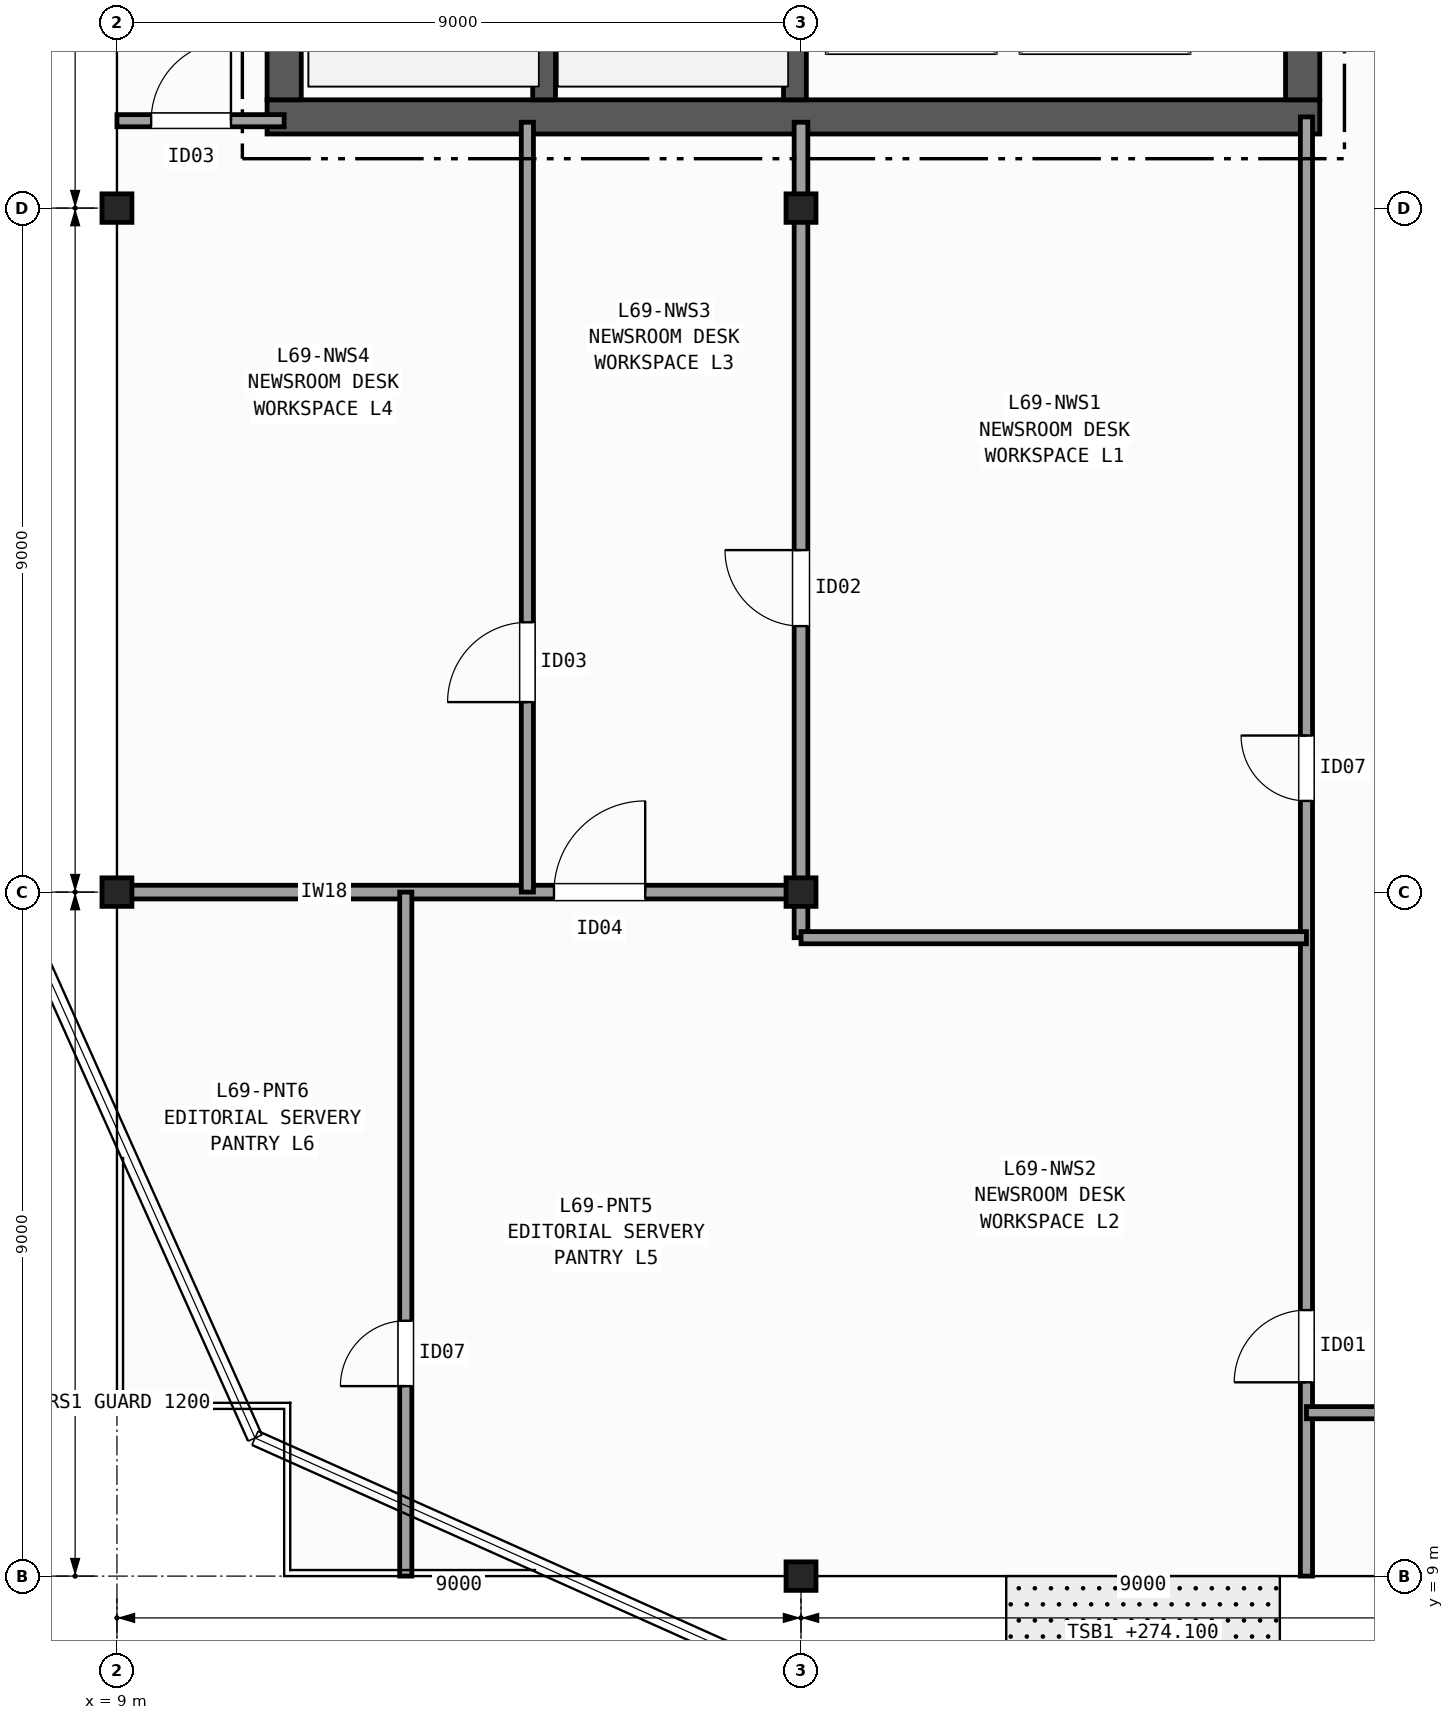
"""IFC4 building model, lengths in metres.
Left out: names, types, materials, properties, quantities, classifications, styles, units other than length and angle.
Written with IfcOpenShell. Run it as: python <this file> out.ifc"""

import sys

from ifc_helpers import new_model, si_unit, direction, frame, frame_2d, origin, origin_2d, place, context, subcontext, project, spatial, rectangle, i_section, extrude, element, fill, save


model = new_model("IFC4")
c1 = context("Model", 3, precision=1e-05, world=origin(), true_north=direction((0.0, 1.0)))
c2 = subcontext(c1, "Body", "Model", "MODEL_VIEW")
j1 = project(units=[si_unit("LENGTHUNIT", "METRE"), si_unit("PLANEANGLEUNIT", "RADIAN")], contexts=[c1])
p1 = place(None, origin())
s1 = spatial("IfcSite", under=j1, at=p1, CompositionType="ELEMENT")
p2 = place(p1, origin())
s2 = spatial("IfcBuilding", under=s1, at=p2, CompositionType="ELEMENT")
p3 = place(p2, frame((0.0, 0.0, 274.1)))
s3 = spatial("IfcBuildingStorey", under=s2, at=p3, CompositionType="ELEMENT", Elevation=274.1)
for number, where, z_axis, x_axis in (
    (1, (9.0, 18.0, 0.0), (0.0, 0.0, 1.0), (1.0, 0.0, 0.0)),
    (2, (9.0, 27.0, 0.0), (0.0, 0.0, 1.0), (1.0, 0.0, 0.0)),
    (3, (18.0, 9.0, 0.0), (0.0, 0.0, 1.0), (1.0, 0.0, 0.0)),
    (4, (18.0, 18.0, 0.0), (0.0, 0.0, 1.0), (1.0, 0.0, 0.0)),
    (5, (18.0, 27.0, 0.0), (0.0, 0.0, 1.0), (1.0, 0.0, 0.0)),
):
    element("IfcColumn", number, at=place(p3, frame(where, z_axis=z_axis, x_axis=x_axis)), inside=s3, PredefinedType="COLUMN", context=c2, shape_type="SweptSolid", body=[
        extrude(i_section(OverallWidth=0.394, OverallDepth=0.375, WebThickness=0.017, FlangeThickness=0.028, FilletRadius=0.015, at=origin_2d()), origin(), (0.0, 0.0, 1.0), 3.7),
    ])
p4 = place(p3, frame((10.975, 28.2, 0.0), z_axis=(0.0, 0.0, 1.0), x_axis=(1.0, 0.0, 0.0)))
e6 = element("IfcWall", 6, at=p4, inside=s3, PredefinedType="SHEAR", context=c2, shape_type="SweptSolid", body=[
    extrude(rectangle(XDim=13.85, YDim=0.45, at=frame_2d((6.925, 0.0))), origin(), (0.0, 0.0, 1.0), 3.42),
])
p5 = place(p3, frame((11.2, 42.175, 0.0), z_axis=(0.0, 0.0, 1.0), x_axis=(0.0, -1.0, 0.0)))
e7 = element("IfcWall", 7, at=p5, inside=s3, PredefinedType="SHEAR", context=c2, shape_type="SweptSolid", body=[
    extrude(rectangle(XDim=13.75, YDim=0.45, at=frame_2d((6.875, 0.0))), origin(), (0.0, 0.0, 1.0), 3.42),
])
p6 = place(p3, frame((24.6, 28.425, 0.0), z_axis=(0.0, 0.0, 1.0), x_axis=(0.0, 1.0, 0.0)))
e8 = element("IfcWall", 8, at=p6, inside=s3, PredefinedType="SHEAR", context=c2, shape_type="SweptSolid", body=[
    extrude(rectangle(XDim=13.75, YDim=0.45, at=frame_2d((6.875, 0.0))), origin(), (0.0, 0.0, 1.0), 3.42),
])
p7 = place(p6, frame((3.375, 0.0, 0.0)))
e9 = element("IfcOpeningElement", 9, at=p7, cuts=e8, PredefinedType="OPENING", context=c2, shape_type="SweptSolid", body=[
    extrude(rectangle(XDim=1.5, YDim=2.2, at=frame_2d((0.75, 1.1))), frame((0.0, 0.235, 0.0), z_axis=(0.0, -1.0, 0.0), x_axis=(1.0, 0.0, 0.0)), (0.0, 0.0, 1.0), 0.47),
])
p8 = place(p6, frame((9.975, 0.0, 0.0)))
e10 = element("IfcOpeningElement", 10, at=p8, cuts=e8, PredefinedType="OPENING", context=c2, shape_type="SweptSolid", body=[
    extrude(rectangle(XDim=0.9, YDim=2.1, at=frame_2d((0.45, 1.05))), frame((0.0, 0.235, 0.0), z_axis=(0.0, -1.0, 0.0), x_axis=(1.0, 0.0, 0.0)), (0.0, 0.0, 1.0), 0.47),
])
p9 = place(p3, frame((14.62, 28.425, 0.0), z_axis=(0.0, 0.0, 1.0), x_axis=(0.0, 1.0, 0.0)))
e11 = element("IfcWall", 11, at=p9, inside=s3, PredefinedType="SHEAR", context=c2, shape_type="SweptSolid", body=[
    extrude(rectangle(XDim=9.025, YDim=0.3, at=frame_2d((4.512, 0.0))), origin(), (0.0, 0.0, 1.0), 3.42),
])
p10 = place(p3, frame((17.92, 42.175, 0.0), z_axis=(0.0, 0.0, 1.0), x_axis=(0.0, -1.0, 0.0)))
e12 = element("IfcWall", 12, at=p10, inside=s3, PredefinedType="SHEAR", context=c2, shape_type="SweptSolid", body=[
    extrude(rectangle(XDim=13.75, YDim=0.3, at=frame_2d((6.875, 0.0))), origin(), (0.0, 0.0, 1.0), 3.42),
])
p11 = place(p10, frame((2.0, 0.0, 0.0)))
e13 = element("IfcOpeningElement", 13, at=p11, cuts=e12, PredefinedType="OPENING", context=c2, shape_type="SweptSolid", body=[
    extrude(rectangle(XDim=1.15, YDim=2.15, at=frame_2d((0.575, 1.075))), frame((0.0, 0.16, 0.0), z_axis=(0.0, -1.0, 0.0), x_axis=(1.0, 0.0, 0.0)), (0.0, 0.0, 1.0), 0.32),
])
p12 = place(p3, frame((9.0, 28.15, 0.0), z_axis=(0.0, 0.0, 1.0), x_axis=(1.0, 0.0, 0.0)))
e14 = element("IfcWall", 14, at=p12, inside=s3, PredefinedType="PARTITIONING", context=c2, shape_type="SweptSolid", body=[
    extrude(rectangle(XDim=2.2, YDim=0.16, at=frame_2d((1.1, 0.0))), origin(), (0.0, 0.0, 1.0), 2.707),
])
p13 = place(p12, frame((0.45, 0.0, 0.0)))
e15 = element("IfcOpeningElement", 15, at=p13, cuts=e14, PredefinedType="OPENING", context=c2, shape_type="SweptSolid", body=[
    extrude(rectangle(XDim=1.05, YDim=2.15, at=frame_2d((0.525, 1.075))), frame((0.0, 0.09, 0.0), z_axis=(0.0, -1.0, 0.0), x_axis=(1.0, 0.0, 0.0)), (0.0, 0.0, 1.0), 0.18),
])
p14 = place(p3, frame((24.65, 9.0, 0.0), z_axis=(0.0, 0.0, 1.0), x_axis=(0.0, 1.0, 0.0)))
e16 = element("IfcWall", 16, at=p14, inside=s3, PredefinedType="PARTITIONING", context=c2, shape_type="SweptSolid", body=[
    extrude(rectangle(XDim=19.2, YDim=0.16, at=frame_2d((9.6, 0.0))), origin(), (0.0, 0.0, 1.0), 2.707),
])
p15 = place(p14, frame((10.2, 0.0, 0.0)))
e17 = element("IfcOpeningElement", 17, at=p15, cuts=e16, PredefinedType="OPENING", context=c2, shape_type="SweptSolid", body=[
    extrude(rectangle(XDim=0.86, YDim=2.05, at=frame_2d((0.43, 1.025))), frame((0.0, 0.09, 0.0), z_axis=(0.0, -1.0, 0.0), x_axis=(1.0, 0.0, 0.0)), (0.0, 0.0, 1.0), 0.18),
])
p16 = place(p14, frame((2.55, 0.0, 0.0)))
e18 = element("IfcOpeningElement", 18, at=p16, cuts=e16, PredefinedType="OPENING", context=c2, shape_type="SweptSolid", body=[
    extrude(rectangle(XDim=0.95, YDim=2.1, at=frame_2d((0.475, 1.05))), frame((0.0, 0.09, 0.0), z_axis=(0.0, -1.0, 0.0), x_axis=(1.0, 0.0, 0.0)), (0.0, 0.0, 1.0), 0.18),
])
p17 = place(p3, frame((9.0, 18.0, 0.0), z_axis=(0.0, 0.0, 1.0), x_axis=(1.0, 0.0, 0.0)))
e19 = element("IfcWall", 19, at=p17, inside=s3, PredefinedType="PARTITIONING", context=c2, shape_type="SweptSolid", body=[
    extrude(rectangle(XDim=9.08, YDim=0.18, at=frame_2d((4.54, 0.0))), origin(), (0.0, 0.0, 1.0), 2.707),
])
p18 = place(p17, frame((5.75, 0.0, 0.0)))
e20 = element("IfcOpeningElement", 20, at=p18, cuts=e19, PredefinedType="OPENING", context=c2, shape_type="SweptSolid", body=[
    extrude(rectangle(XDim=1.2, YDim=2.15, at=frame_2d((0.6, 1.075))), frame((0.0, 0.1, 0.0), z_axis=(0.0, -1.0, 0.0), x_axis=(1.0, 0.0, 0.0)), (0.0, 0.0, 1.0), 0.2),
])
p19 = place(p3, frame((18.0, 17.4, 0.0), z_axis=(0.0, 0.0, 1.0), x_axis=(0.0, 1.0, 0.0)))
e21 = element("IfcWall", 21, at=p19, inside=s3, PredefinedType="PARTITIONING", context=c2, shape_type="SweptSolid", body=[
    extrude(rectangle(XDim=10.73, YDim=0.18, at=frame_2d((5.365, 0.0))), origin(), (0.0, 0.0, 1.0), 2.789),
])
p20 = place(p19, frame((4.1, 0.0, 0.0)))
e22 = element("IfcOpeningElement", 22, at=p20, cuts=e21, PredefinedType="OPENING", context=c2, shape_type="SweptSolid", body=[
    extrude(rectangle(XDim=1.0, YDim=2.1, at=frame_2d((0.5, 1.05))), frame((0.0, 0.1, 0.0), z_axis=(0.0, -1.0, 0.0), x_axis=(1.0, 0.0, 0.0)), (0.0, 0.0, 1.0), 0.2),
])
p21 = place(p3, frame((18.0, 17.4, 0.0), z_axis=(0.0, 0.0, 1.0), x_axis=(1.0, 0.0, 0.0)))
e23 = element("IfcWall", 23, at=p21, inside=s3, PredefinedType="PARTITIONING", context=c2, shape_type="SweptSolid", body=[
    extrude(rectangle(XDim=6.65, YDim=0.16, at=frame_2d((3.325, 0.0))), origin(), (0.0, 0.0, 1.0), 2.789),
])
p22 = place(p3, frame((14.4, 18.0, 0.0), z_axis=(0.0, 0.0, 1.0), x_axis=(0.0, 1.0, 0.0)))
e24 = element("IfcWall", 24, at=p22, inside=s3, PredefinedType="PARTITIONING", context=c2, shape_type="SweptSolid", body=[
    extrude(rectangle(XDim=10.13, YDim=0.16, at=frame_2d((5.065, 0.0))), origin(), (0.0, 0.0, 1.0), 2.789),
])
p23 = place(p22, frame((2.5, 0.0, 0.0)))
e25 = element("IfcOpeningElement", 25, at=p23, cuts=e24, PredefinedType="OPENING", context=c2, shape_type="SweptSolid", body=[
    extrude(rectangle(XDim=1.05, YDim=2.15, at=frame_2d((0.525, 1.075))), frame((0.0, 0.09, 0.0), z_axis=(0.0, -1.0, 0.0), x_axis=(1.0, 0.0, 0.0)), (0.0, 0.0, 1.0), 0.18),
])
p24 = place(p3, frame((12.8, 9.0, 0.0), z_axis=(0.0, 0.0, 1.0), x_axis=(0.0, 1.0, 0.0)))
e26 = element("IfcWall", 26, at=p24, inside=s3, PredefinedType="PARTITIONING", context=c2, shape_type="SweptSolid", body=[
    extrude(rectangle(XDim=9.0, YDim=0.16, at=frame_2d((4.5, 0.0))), origin(), (0.0, 0.0, 1.0), 2.789),
])
p25 = place(p24, frame((2.5, 0.0, 0.0)))
e27 = element("IfcOpeningElement", 27, at=p25, cuts=e26, PredefinedType="OPENING", context=c2, shape_type="SweptSolid", body=[
    extrude(rectangle(XDim=0.86, YDim=2.05, at=frame_2d((0.43, 1.025))), frame((0.0, 0.09, 0.0), z_axis=(0.0, -1.0, 0.0), x_axis=(1.0, 0.0, 0.0)), (0.0, 0.0, 1.0), 0.18),
])
p26 = place(p3, frame((24.65, 11.15, 0.0), z_axis=(0.0, 0.0, 1.0), x_axis=(1.0, 0.0, 0.0)))
e28 = element("IfcWall", 28, at=p26, inside=s3, PredefinedType="PARTITIONING", context=c2, shape_type="SweptSolid", body=[
    extrude(rectangle(XDim=4.75, YDim=0.16, at=frame_2d((2.375, 0.0))), origin(), (0.0, 0.0, 1.0), 2.792),
])
p27 = place(p26, frame((1.2, 0.0, 0.0)))
e29 = element("IfcOpeningElement", 29, at=p27, cuts=e28, PredefinedType="OPENING", context=c2, shape_type="SweptSolid", body=[
    extrude(rectangle(XDim=0.95, YDim=2.1, at=frame_2d((0.475, 1.05))), frame((0.0, 0.09, 0.0), z_axis=(0.0, -1.0, 0.0), x_axis=(1.0, 0.0, 0.0)), (0.0, 0.0, 1.0), 0.18),
])
p28 = place(p13, origin())
e30 = element("IfcDoor", 30, at=p28, inside=s3, OperationType="SINGLE_SWING_RIGHT", PredefinedType="DOOR", context=c2, shape_type="SweptSolid", body=[
    extrude(rectangle(XDim=1.05, YDim=2.15, at=frame_2d((0.525, 1.075))), frame((0.0, 0.025, 0.0), z_axis=(0.0, -1.0, 0.0), x_axis=(1.0, 0.0, 0.0)), (0.0, 0.0, 1.0), 0.05),
])
fill(e15, e30)
p29 = place(p15, origin())
e31 = element("IfcDoor", 31, at=p29, inside=s3, OperationType="SINGLE_SWING_RIGHT", PredefinedType="DOOR", context=c2, shape_type="SweptSolid", body=[
    extrude(rectangle(XDim=0.86, YDim=2.05, at=frame_2d((0.43, 1.025))), frame((0.0, 0.025, 0.0), z_axis=(0.0, -1.0, 0.0), x_axis=(1.0, 0.0, 0.0)), (0.0, 0.0, 1.0), 0.05),
])
fill(e17, e31)
p30 = place(p16, origin())
e32 = element("IfcDoor", 32, at=p30, inside=s3, OperationType="SINGLE_SWING_LEFT", PredefinedType="DOOR", context=c2, shape_type="SweptSolid", body=[
    extrude(rectangle(XDim=0.95, YDim=2.1, at=frame_2d((0.475, 1.05))), frame((0.0, 0.025, 0.0), z_axis=(0.0, -1.0, 0.0), x_axis=(1.0, 0.0, 0.0)), (0.0, 0.0, 1.0), 0.05),
])
fill(e18, e32)
p31 = place(p20, origin())
e33 = element("IfcDoor", 33, at=p31, inside=s3, OperationType="SINGLE_SWING_RIGHT", PredefinedType="DOOR", context=c2, shape_type="SweptSolid", body=[
    extrude(rectangle(XDim=1.0, YDim=2.1, at=frame_2d((0.5, 1.05))), frame((0.0, 0.025, 0.0), z_axis=(0.0, -1.0, 0.0), x_axis=(1.0, 0.0, 0.0)), (0.0, 0.0, 1.0), 0.05),
])
fill(e22, e33)
p32 = place(p23, origin())
e34 = element("IfcDoor", 34, at=p32, inside=s3, OperationType="SINGLE_SWING_LEFT", PredefinedType="DOOR", context=c2, shape_type="SweptSolid", body=[
    extrude(rectangle(XDim=1.05, YDim=2.15, at=frame_2d((0.525, 1.075))), frame((0.0, 0.025, 0.0), z_axis=(0.0, -1.0, 0.0), x_axis=(1.0, 0.0, 0.0)), (0.0, 0.0, 1.0), 0.05),
])
fill(e25, e34)
p33 = place(p18, origin())
e35 = element("IfcDoor", 35, at=p33, inside=s3, OperationType="SINGLE_SWING_RIGHT", PredefinedType="DOOR", context=c2, shape_type="SweptSolid", body=[
    extrude(rectangle(XDim=1.2, YDim=2.15, at=frame_2d((0.6, 1.075))), frame((0.0, 0.025, 0.0), z_axis=(0.0, -1.0, 0.0), x_axis=(1.0, 0.0, 0.0)), (0.0, 0.0, 1.0), 0.05),
])
fill(e20, e35)
p34 = place(p25, origin())
e36 = element("IfcDoor", 36, at=p34, inside=s3, OperationType="SINGLE_SWING_LEFT", PredefinedType="DOOR", context=c2, shape_type="SweptSolid", body=[
    extrude(rectangle(XDim=0.86, YDim=2.05, at=frame_2d((0.43, 1.025))), frame((0.0, 0.025, 0.0), z_axis=(0.0, -1.0, 0.0), x_axis=(1.0, 0.0, 0.0)), (0.0, 0.0, 1.0), 0.05),
])
fill(e27, e36)
save(model, sys.argv[1])
